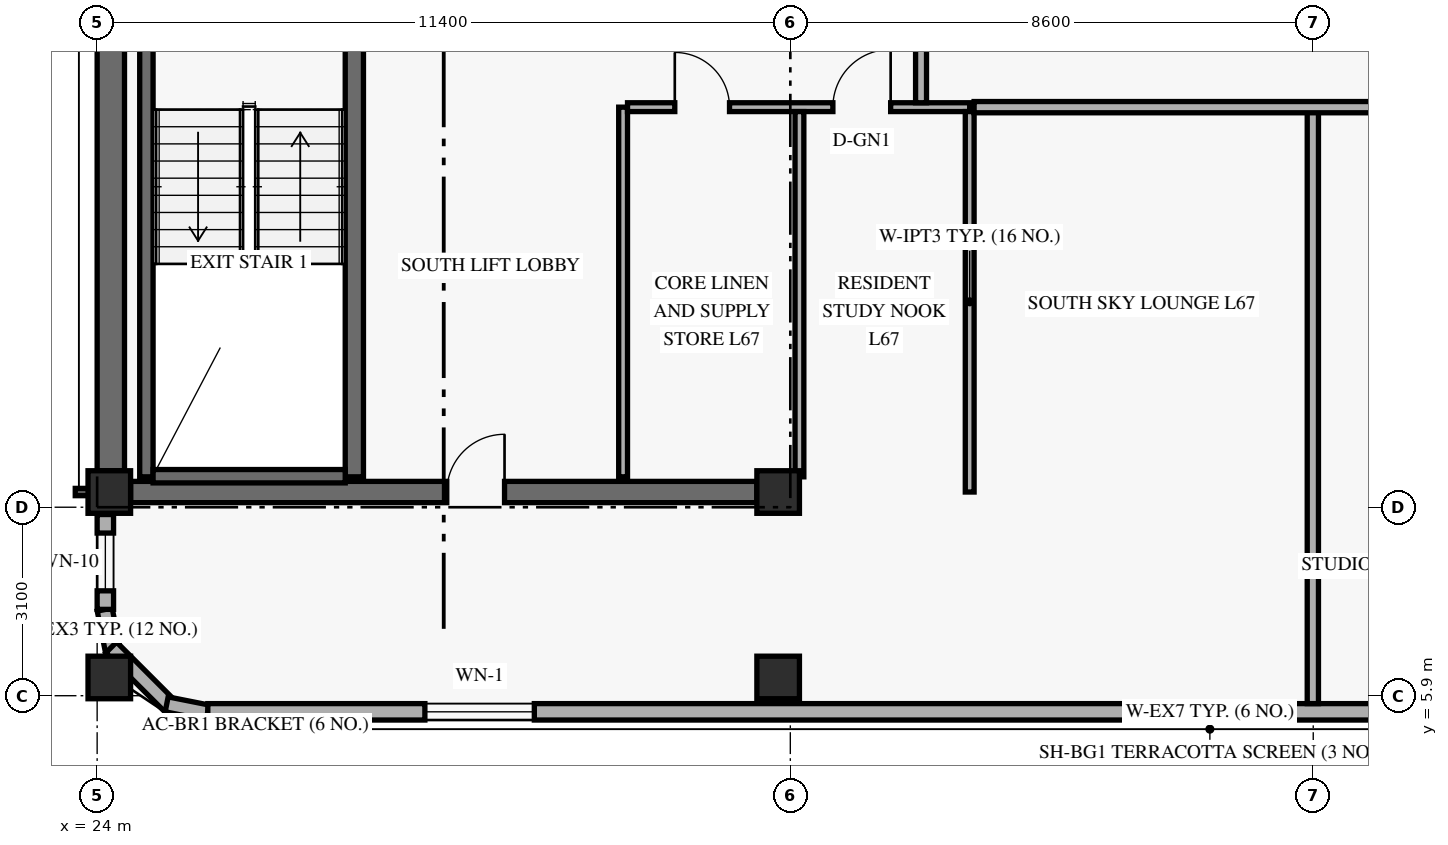
"""IFC4 building model, lengths in metres.
Left out: names, types, materials, properties, quantities, classifications, styles, units other than length and angle.
Written with IfcOpenShell. Run it as: python <this file> out.ifc"""

import sys

from ifc_helpers import new_model, si_unit, direction, frame, frame_2d, origin, origin_2d, place, context, subcontext, project, spatial, rectangle, extrude, element, fill, save


model = new_model("IFC4")
c1 = context("Model", 3, precision=1e-05, world=origin(), true_north=direction((0.0, 1.0)))
c2 = subcontext(c1, "Body", "Model", "MODEL_VIEW")
j1 = project(units=[si_unit("LENGTHUNIT", "METRE"), si_unit("PLANEANGLEUNIT", "RADIAN")], contexts=[c1])
p1 = place(None, origin())
s1 = spatial("IfcSite", under=j1, at=p1, CompositionType="ELEMENT")
p2 = place(p1, origin())
s2 = spatial("IfcBuilding", under=s1, at=p2, CompositionType="ELEMENT")
p3 = place(p2, frame((0.0, 0.0, 256.8)))
s3 = spatial("IfcBuildingStorey", under=s2, at=p3, CompositionType="ELEMENT", Elevation=256.8)
p4 = place(p3, frame((24.225, 9.6, 0.0), z_axis=(0.0, 0.0, 1.0), x_axis=(0.0, 1.0, 0.0)))
e1 = element("IfcWall", 1, at=p4, inside=s3, PredefinedType="SHEAR", context=c2, shape_type="SweptSolid", body=[
    extrude(rectangle(XDim=7.6, YDim=0.45, at=frame_2d((3.8, 0.0))), origin(), (0.0, 0.0, 1.0), 2.821),
])
p5 = place(p3, frame((24.55, 9.25, 0.0), z_axis=(0.0, 0.0, 1.0), x_axis=(1.0, 0.0, 0.0)))
e2 = element("IfcWall", 2, at=p5, inside=s3, PredefinedType="SHEAR", context=c2, shape_type="SweptSolid", body=[
    extrude(rectangle(XDim=10.3, YDim=0.35, at=frame_2d((5.15, 0.0))), origin(), (0.0, 0.0, 1.0), 3.36),
])
p6 = place(p5, frame((5.2, 0.0, 0.0)))
e3 = element("IfcOpeningElement", 3, at=p6, cuts=e2, PredefinedType="OPENING", context=c2, shape_type="SweptSolid", body=[
    extrude(rectangle(XDim=0.95, YDim=2.15, at=frame_2d((0.475, 1.075))), frame((0.0, 0.185, 0.0), z_axis=(0.0, -1.0, 0.0), x_axis=(1.0, 0.0, 0.0)), (0.0, 0.0, 1.0), 0.37),
])
p7 = place(p3, frame((24.81, 9.5, 0.0), z_axis=(0.0, 0.0, 1.0), x_axis=(0.0, 1.0, 0.0)))
e4 = element("IfcWall", 4, at=p7, inside=s3, PredefinedType="SHEAR", context=c2, shape_type="SweptSolid", body=[
    extrude(rectangle(XDim=7.76, YDim=0.22, at=frame_2d((3.88, 0.0))), origin(), (0.0, 0.0, 1.0), 3.36),
])
p8 = place(p3, frame((28.23, 9.5, 0.0), z_axis=(0.0, 0.0, 1.0), x_axis=(0.0, 1.0, 0.0)))
e5 = element("IfcWall", 5, at=p8, inside=s3, PredefinedType="SHEAR", context=c2, shape_type="SweptSolid", body=[
    extrude(rectangle(XDim=7.76, YDim=0.3, at=frame_2d((3.88, 0.0))), origin(), (0.0, 0.0, 1.0), 3.36),
])
p9 = place(p3, frame((24.92, 9.51, 0.0), z_axis=(0.0, 0.0, 1.0), x_axis=(1.0, 0.0, 0.0)))
e6 = element("IfcWall", 6, at=p9, inside=s3, PredefinedType="SHEAR", context=c2, shape_type="SweptSolid", body=[
    extrude(rectangle(XDim=3.16, YDim=0.22, at=frame_2d((1.58, 0.0))), origin(), (0.0, 0.0, 1.0), 3.36),
])
for number, where, z_axis, x_axis in (
    (7, (24.2, 6.2, 0.0), (0.0, 0.0, 1.0), (1.0, 0.0, 0.0)),
    (8, (24.2, 9.25, 0.0), (0.0, 0.0, 1.0), (1.0, 0.0, 0.0)),
    (9, (35.2, 6.2, 0.0), (0.0, 0.0, 1.0), (1.0, 0.0, 0.0)),
    (10, (35.2, 9.25, 0.0), (0.0, 0.0, 1.0), (1.0, 0.0, 0.0)),
):
    element("IfcColumn", number, at=place(p3, frame(where, z_axis=z_axis, x_axis=x_axis)), inside=s3, PredefinedType="COLUMN", context=c2, shape_type="SweptSolid", body=[
        extrude(rectangle(XDim=0.7, YDim=0.7, at=origin_2d()), origin(), (0.0, 0.0, 1.0), 3.6),
    ])
p10 = place(p3, frame((24.124, 7.316, 0.0), z_axis=(0.0, 0.0, 1.0), x_axis=(0.194952956674, -0.980812594069, 0.0)))
e11 = element("IfcWall", 11, at=p10, inside=s3, PredefinedType="SOLIDWALL", context=c2, shape_type="SweptSolid", body=[
    extrude(rectangle(XDim=0.686, YDim=0.25, at=frame_2d((0.343, 0.0))), origin(), (0.0, 0.0, 1.0), 2.803),
])
p11 = place(p3, frame((24.231, 6.694, 0.0), z_axis=(0.0, 0.0, 1.0), x_axis=(0.707106781187, -0.707106781187, 0.0)))
e12 = element("IfcWall", 12, at=p11, inside=s3, PredefinedType="SOLIDWALL", context=c2, shape_type="SweptSolid", body=[
    extrude(rectangle(XDim=1.362, YDim=0.25, at=frame_2d((0.681, 0.0))), origin(), (0.0, 0.0, 1.0), 2.803),
])
p12 = place(p3, frame((25.143, 5.758, 0.0), z_axis=(0.0, 0.0, 1.0), x_axis=(0.980812594069, -0.194952956674, 0.0)))
e13 = element("IfcWall", 13, at=p12, inside=s3, PredefinedType="SOLIDWALL", context=c2, shape_type="SweptSolid", body=[
    extrude(rectangle(XDim=0.686, YDim=0.25, at=frame_2d((0.343, 0.0))), origin(), (0.0, 0.0, 1.0), 3.36),
])
p13 = place(p3, frame((25.82, 5.635, 0.0), z_axis=(0.0, 0.0, 1.0), x_axis=(1.0, 0.0, 0.0)))
e14 = element("IfcWall", 14, at=p13, inside=s3, PredefinedType="SOLIDWALL", context=c2, shape_type="SweptSolid", body=[
    extrude(rectangle(XDim=32.96, YDim=0.27, at=frame_2d((16.48, 0.0))), origin(), (0.0, 0.0, 1.0), 3.36),
])
p14 = place(p13, frame((3.57, 0.0, 0.85)))
e15 = element("IfcOpeningElement", 15, at=p14, cuts=e14, PredefinedType="OPENING", context=c2, shape_type="SweptSolid", body=[
    extrude(rectangle(XDim=1.8, YDim=1.6, at=frame_2d((0.9, 0.8))), frame((0.0, 0.145, 0.0), z_axis=(0.0, -1.0, 0.0), x_axis=(1.0, 0.0, 0.0)), (0.0, 0.0, 1.0), 0.29),
])
p15 = place(p13, frame((19.55, 0.0, 0.85)))
e16 = element("IfcOpeningElement", 16, at=p15, cuts=e14, PredefinedType="OPENING", context=c2, shape_type="SweptSolid", body=[
    extrude(rectangle(XDim=1.8, YDim=1.6, at=frame_2d((0.9, 0.8))), frame((0.0, 0.145, 0.0), z_axis=(0.0, -1.0, 0.0), x_axis=(1.0, 0.0, 0.0)), (0.0, 0.0, 1.0), 0.29),
])
p16 = place(p13, frame((24.142, 0.0, 0.85)))
e17 = element("IfcOpeningElement", 17, at=p16, cuts=e14, PredefinedType="OPENING", context=c2, shape_type="SweptSolid", body=[
    extrude(rectangle(XDim=1.2, YDim=1.5, at=frame_2d((0.6, 0.75))), frame((0.0, 0.145, 0.0), z_axis=(0.0, -1.0, 0.0), x_axis=(1.0, 0.0, 0.0)), (0.0, 0.0, 1.0), 0.29),
])
p17 = place(p13, frame((27.587, 0.0, 0.85)))
e18 = element("IfcOpeningElement", 18, at=p17, cuts=e14, PredefinedType="OPENING", context=c2, shape_type="SweptSolid", body=[
    extrude(rectangle(XDim=1.8, YDim=1.6, at=frame_2d((0.9, 0.8))), frame((0.0, 0.145, 0.0), z_axis=(0.0, -1.0, 0.0), x_axis=(1.0, 0.0, 0.0)), (0.0, 0.0, 1.0), 0.29),
])
p18 = place(p3, frame((24.135, 7.32, 0.0), z_axis=(0.0, 0.0, 1.0), x_axis=(0.0, 1.0, 0.0)))
e19 = element("IfcWall", 19, at=p18, inside=s3, PredefinedType="SOLIDWALL", context=c2, shape_type="SweptSolid", body=[
    extrude(rectangle(XDim=1.56, YDim=0.27, at=frame_2d((0.78, 0.0))), origin(), (0.0, 0.0, 1.0), 2.803),
])
p19 = place(p18, frame((0.305, 0.0, 0.85)))
e20 = element("IfcOpeningElement", 20, at=p19, cuts=e19, PredefinedType="OPENING", context=c2, shape_type="SweptSolid", body=[
    extrude(rectangle(XDim=0.95, YDim=1.5, at=frame_2d((0.475, 0.75))), frame((0.0, 0.145, 0.0), z_axis=(0.0, -1.0, 0.0), x_axis=(1.0, 0.0, 0.0)), (0.0, 0.0, 1.0), 0.29),
])
p20 = place(p3, frame((32.65, 9.5, 0.0), z_axis=(0.0, 0.0, 1.0), x_axis=(0.0, 1.0, 0.0)))
e21 = element("IfcWall", 21, at=p20, inside=s3, PredefinedType="PARTITIONING", context=c2, shape_type="SweptSolid", body=[
    extrude(rectangle(XDim=6.08, YDim=0.145, at=frame_2d((3.04, 0.0))), origin(), (0.0, 0.0, 1.0), 3.36),
])
p21 = place(p3, frame((32.722, 15.58, 0.0), z_axis=(0.0, 0.0, 1.0), x_axis=(1.0, 0.0, 0.0)))
e22 = element("IfcWall", 22, at=p21, inside=s3, PredefinedType="PARTITIONING", context=c2, shape_type="SweptSolid", body=[
    extrude(rectangle(XDim=5.628, YDim=0.145, at=frame_2d((2.814, 0.0))), origin(), (0.0, 0.0, 1.0), 2.803),
])
p22 = place(p21, frame((0.778, 0.0, 0.0)))
e23 = element("IfcOpeningElement", 23, at=p22, cuts=e22, PredefinedType="OPENING", context=c2, shape_type="SweptSolid", body=[
    extrude(rectangle(XDim=0.9, YDim=2.1, at=frame_2d((0.45, 1.05))), frame((0.0, 0.083, 0.0), z_axis=(0.0, -1.0, 0.0), x_axis=(1.0, 0.0, 0.0)), (0.0, 0.0, 1.0), 0.165),
])
p23 = place(p21, frame((3.377, 0.0, 0.0)))
e24 = element("IfcOpeningElement", 24, at=p23, cuts=e22, PredefinedType="OPENING", context=c2, shape_type="SweptSolid", body=[
    extrude(rectangle(XDim=0.95, YDim=2.15, at=frame_2d((0.475, 1.075))), frame((0.0, 0.083, 0.0), z_axis=(0.0, -1.0, 0.0), x_axis=(1.0, 0.0, 0.0)), (0.0, 0.0, 1.0), 0.165),
])
p24 = place(p3, frame((38.35, 9.25, 0.0), z_axis=(0.0, 0.0, 1.0), x_axis=(0.0, 1.0, 0.0)))
e25 = element("IfcWall", 25, at=p24, inside=s3, PredefinedType="PARTITIONING", context=c2, shape_type="SweptSolid", body=[
    extrude(rectangle(XDim=6.258, YDim=0.145, at=frame_2d((3.129, 0.0))), origin(), (0.0, 0.0, 1.0), 2.803),
])
p25 = place(p3, frame((35.55, 9.5, 0.0), z_axis=(0.0, 0.0, 1.0), x_axis=(0.0, 1.0, 0.0)))
e26 = element("IfcWall", 26, at=p25, inside=s3, PredefinedType="PARTITIONING", context=c2, shape_type="SweptSolid", body=[
    extrude(rectangle(XDim=6.008, YDim=0.145, at=frame_2d((3.004, 0.0))), origin(), (0.0, 0.0, 1.0), 3.039),
])
p26 = place(p3, frame((37.55, 15.653, 0.0), z_axis=(0.0, 0.0, 1.0), x_axis=(0.0, 1.0, 0.0)))
e27 = element("IfcWall", 27, at=p26, inside=s3, PredefinedType="STANDARD", context=c2, shape_type="SweptSolid", body=[
    extrude(rectangle(XDim=7.147, YDim=0.18, at=frame_2d((3.574, 0.0))), origin(), (0.0, 0.0, 1.0), 2.803),
])
p27 = place(p3, frame((43.993, 5.77, 0.0), z_axis=(0.0, 0.0, 1.0), x_axis=(0.0, 1.0, 0.0)))
e28 = element("IfcWall", 28, at=p27, inside=s3, PredefinedType="PARTITIONING", context=c2, shape_type="SweptSolid", body=[
    extrude(rectangle(XDim=9.81, YDim=0.185, at=frame_2d((4.905, 0.0))), origin(), (0.0, 0.0, 1.0), 2.803),
])
p28 = place(p3, frame((38.423, 15.58, 0.0), z_axis=(0.0, 0.0, 1.0), x_axis=(1.0, 0.0, 0.0)))
e29 = element("IfcWall", 29, at=p28, inside=s3, PredefinedType="PARTITIONING", context=c2, shape_type="SweptSolid", body=[
    extrude(rectangle(XDim=11.125, YDim=0.185, at=frame_2d((5.562, 0.0))), origin(), (0.0, 0.0, 1.0), 2.803),
])
p29 = place(p14, origin())
e30 = element("IfcWindow", 30, at=p29, inside=s3, PartitioningType="SINGLE_PANEL", PredefinedType="WINDOW", context=c2, shape_type="SweptSolid", body=[
    extrude(rectangle(XDim=1.8, YDim=1.6, at=frame_2d((0.9, 0.8))), frame((0.0, 0.03, 0.0), z_axis=(0.0, -1.0, 0.0), x_axis=(1.0, 0.0, 0.0)), (0.0, 0.0, 1.0), 0.06),
])
fill(e15, e30)
p30 = place(p19, origin())
e31 = element("IfcWindow", 31, at=p30, inside=s3, PartitioningType="SINGLE_PANEL", PredefinedType="WINDOW", context=c2, shape_type="SweptSolid", body=[
    extrude(rectangle(XDim=0.95, YDim=1.5, at=frame_2d((0.475, 0.75))), frame((0.0, 0.03, 0.0), z_axis=(0.0, -1.0, 0.0), x_axis=(1.0, 0.0, 0.0)), (0.0, 0.0, 1.0), 0.06),
])
fill(e20, e31)
p31 = place(p22, origin())
e32 = element("IfcDoor", 32, at=p31, inside=s3, OperationType="SINGLE_SWING_LEFT", PredefinedType="DOOR", context=c2, shape_type="SweptSolid", body=[
    extrude(rectangle(XDim=0.9, YDim=2.1, at=frame_2d((0.45, 1.05))), frame((0.0, 0.025, 0.0), z_axis=(0.0, -1.0, 0.0), x_axis=(1.0, 0.0, 0.0)), (0.0, 0.0, 1.0), 0.05),
])
fill(e23, e32)
p32 = place(p23, origin())
e33 = element("IfcDoor", 33, at=p32, inside=s3, OperationType="SINGLE_SWING_RIGHT", PredefinedType="DOOR", context=c2, shape_type="SweptSolid", body=[
    extrude(rectangle(XDim=0.95, YDim=2.15, at=frame_2d((0.475, 1.075))), frame((0.0, 0.025, 0.0), z_axis=(0.0, -1.0, 0.0), x_axis=(1.0, 0.0, 0.0)), (0.0, 0.0, 1.0), 0.05),
])
fill(e24, e33)
p33 = place(p6, frame((0.95, 0.0, 0.0), z_axis=(0.0, 0.0, 1.0), x_axis=(-1.0, 0.0, 0.0)))
e34 = element("IfcDoor", 34, at=p33, inside=s3, OperationType="SINGLE_SWING_LEFT", PredefinedType="DOOR", context=c2, shape_type="SweptSolid", body=[
    extrude(rectangle(XDim=0.95, YDim=2.15, at=frame_2d((0.475, 1.075))), frame((0.0, 0.025, 0.0), z_axis=(0.0, -1.0, 0.0), x_axis=(1.0, 0.0, 0.0)), (0.0, 0.0, 1.0), 0.05),
])
fill(e3, e34)
save(model, sys.argv[1])
